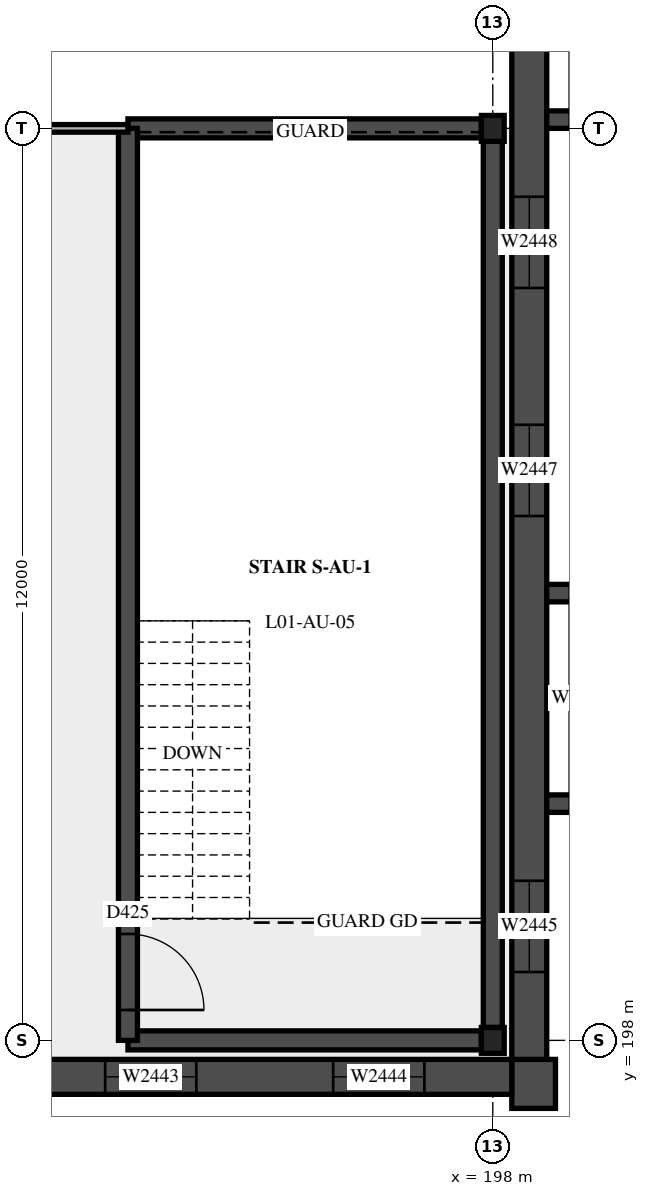
"""IFC4 building model, lengths in metres.
Left out: names, types, materials, properties, quantities, classifications, styles, units other than length and angle.
Written with IfcOpenShell. Run it as: python <this file> out.ifc"""

import sys

from ifc_helpers import new_model, si_unit, direction, frame, frame_2d, origin, origin_2d, place, context, subcontext, project, spatial, rectangle, i_section, extrude, element, fill, save


model = new_model("IFC4")
c1 = context("Model", 3, precision=1e-05, world=origin(), true_north=direction((0.0, 1.0)))
c2 = subcontext(c1, "Body", "Model", "MODEL_VIEW")
j1 = project(units=[si_unit("LENGTHUNIT", "METRE"), si_unit("PLANEANGLEUNIT", "RADIAN")], contexts=[c1])
p1 = place(None, origin())
s1 = spatial("IfcSite", under=j1, at=p1, CompositionType="ELEMENT")
p2 = place(p1, origin())
s2 = spatial("IfcBuilding", under=s1, at=p2, CompositionType="ELEMENT")
p3 = place(p2, frame((0.0, 0.0, 5.4)))
s3 = spatial("IfcBuildingStorey", under=s2, at=p3, CompositionType="ELEMENT", Elevation=5.4)
for number, where, z_axis, x_axis in (
    (1, (198.0, 198.0, 0.0), (0.0, 0.0, 1.0), (1.0, 0.0, 0.0)),
    (2, (198.0, 210.0, 0.0), (0.0, 0.0, 1.0), (1.0, 0.0, 0.0)),
):
    element("IfcColumn", number, at=place(p3, frame(where, z_axis=z_axis, x_axis=x_axis)), inside=s3, PredefinedType="COLUMN", context=c2, shape_type="SweptSolid", body=[
        extrude(i_section(OverallWidth=0.3, OverallDepth=0.34, WebThickness=0.012, FlangeThickness=0.021, at=origin_2d()), origin(), (0.0, 0.0, 1.0), 5.4),
    ])
p4 = place(p3, frame((193.2, 198.0, 0.0), z_axis=(0.0, 0.0, 1.0), x_axis=(1.0, 0.0, 0.0)))
e3 = element("IfcWall", 3, at=p4, inside=s3, PredefinedType="SHEAR", context=c2, shape_type="SweptSolid", body=[
    extrude(rectangle(XDim=4.65, YDim=0.25, at=frame_2d((2.325, 0.0))), origin(), (0.0, 0.0, 1.0), 4.6),
])
p5 = place(p3, frame((198.0, 198.17, 0.0), z_axis=(0.0, 0.0, 1.0), x_axis=(0.0, 1.0, 0.0)))
e4 = element("IfcWall", 4, at=p5, inside=s3, PredefinedType="SHEAR", context=c2, shape_type="SweptSolid", body=[
    extrude(rectangle(XDim=11.66, YDim=0.25, at=frame_2d((5.83, 0.0))), origin(), (0.0, 0.0, 1.0), 4.6),
])
p6 = place(p3, frame((193.2, 210.0, 0.0), z_axis=(0.0, 0.0, 1.0), x_axis=(1.0, 0.0, 0.0)))
e5 = element("IfcWall", 5, at=p6, inside=s3, PredefinedType="SHEAR", context=c2, shape_type="SweptSolid", body=[
    extrude(rectangle(XDim=4.65, YDim=0.25, at=frame_2d((2.325, 0.0))), origin(), (0.0, 0.0, 1.0), 4.6),
])
p7 = place(p3, frame((193.2, 198.0, 0.0), z_axis=(0.0, 0.0, 1.0), x_axis=(0.0, 1.0, 0.0)))
e6 = element("IfcWall", 6, at=p7, inside=s3, PredefinedType="SHEAR", context=c2, shape_type="SweptSolid", body=[
    extrude(rectangle(XDim=12.0, YDim=0.25, at=frame_2d((6.0, 0.0))), origin(), (0.0, 0.0, 1.0), 4.6),
])
p8 = place(p7, frame((0.4, 0.0, 0.0)))
e7 = element("IfcOpeningElement", 7, at=p8, cuts=e6, PredefinedType="OPENING", context=c2, shape_type="SweptSolid", body=[
    extrude(rectangle(XDim=1.0, YDim=2.1, at=frame_2d((0.5, 1.05))), frame((0.0, 0.135, 0.0), z_axis=(0.0, -1.0, 0.0), x_axis=(1.0, 0.0, 0.0)), (0.0, 0.0, 1.0), 0.27),
])
p9 = place(p3, frame((198.25, 197.393, -0.39), z_axis=(0.0, 0.0, 1.0), x_axis=(1.0, 0.0, 0.0)))
e8 = element("IfcWall", 8, at=p9, inside=s3, PredefinedType="SOLIDWALL", context=c2, shape_type="SweptSolid", body=[
    extrude(rectangle(XDim=0.69, YDim=0.715, at=frame_2d((0.345, 0.0))), origin(), (0.0, 0.0, 1.0), 0.13),
])
p10 = place(p3, frame((198.25, 197.357, -0.26), z_axis=(0.0, 0.0, 1.0), x_axis=(1.0, 0.0, 0.0)))
e9 = element("IfcWall", 9, at=p10, inside=s3, PredefinedType="SOLIDWALL", context=c2, shape_type="SweptSolid", body=[
    extrude(rectangle(XDim=0.805, YDim=0.785, at=frame_2d((0.402, 0.0))), origin(), (0.0, 0.0, 1.0), 0.13),
])
p11 = place(p3, frame((198.25, 197.323, -0.13), z_axis=(0.0, 0.0, 1.0), x_axis=(1.0, 0.0, 0.0)))
e10 = element("IfcWall", 10, at=p11, inside=s3, PredefinedType="SOLIDWALL", context=c2, shape_type="SweptSolid", body=[
    extrude(rectangle(XDim=0.92, YDim=0.855, at=frame_2d((0.46, 0.0))), origin(), (0.0, 0.0, 1.0), 0.13),
])
p12 = place(p3, frame((198.25, 197.427, 0.0), z_axis=(0.0, 0.0, 1.0), x_axis=(1.0, 0.0, 0.0)))
e11 = element("IfcWall", 11, at=p12, inside=s3, PredefinedType="SOLIDWALL", context=c2, shape_type="SweptSolid", body=[
    extrude(rectangle(XDim=0.575, YDim=0.645, at=frame_2d((0.288, 0.0))), origin(), (0.0, 0.0, 1.0), 5.01),
])
p13 = place(p3, frame((198.25, 197.393, 5.01), z_axis=(0.0, 0.0, 1.0), x_axis=(1.0, 0.0, 0.0)))
e12 = element("IfcWall", 12, at=p13, inside=s3, PredefinedType="SOLIDWALL", context=c2, shape_type="SweptSolid", body=[
    extrude(rectangle(XDim=0.69, YDim=0.715, at=frame_2d((0.345, 0.0))), origin(), (0.0, 0.0, 1.0), 0.13),
])
p14 = place(p3, frame((198.25, 197.357, 5.14), z_axis=(0.0, 0.0, 1.0), x_axis=(1.0, 0.0, 0.0)))
e13 = element("IfcWall", 13, at=p14, inside=s3, PredefinedType="SOLIDWALL", context=c2, shape_type="SweptSolid", body=[
    extrude(rectangle(XDim=0.805, YDim=0.785, at=frame_2d((0.402, 0.0))), origin(), (0.0, 0.0, 1.0), 0.13),
])
p15 = place(p3, frame((198.25, 197.323, 5.27), z_axis=(0.0, 0.0, 1.0), x_axis=(1.0, 0.0, 0.0)))
e14 = element("IfcWall", 14, at=p15, inside=s3, PredefinedType="SOLIDWALL", context=c2, shape_type="SweptSolid", body=[
    extrude(rectangle(XDim=0.92, YDim=0.855, at=frame_2d((0.46, 0.0))), origin(), (0.0, 0.0, 1.0), 0.13),
])
p16 = place(p3, frame((161.75, 197.52, 0.0), z_axis=(0.0, 0.0, 1.0), x_axis=(1.0, 0.0, 0.0)))
e15 = element("IfcWall", 15, at=p16, inside=s3, PredefinedType="SOLIDWALL", context=c2, shape_type="SweptSolid", body=[
    extrude(rectangle(XDim=36.5, YDim=0.46, at=frame_2d((18.25, 0.0))), origin(), (0.0, 0.0, 1.0), 5.4),
])
p17 = place(p16, frame((1.15, 0.0, 0.9)))
e16 = element("IfcOpeningElement", 16, at=p17, cuts=e15, PredefinedType="OPENING", context=c2, shape_type="SweptSolid", body=[
    extrude(rectangle(XDim=1.2, YDim=3.3, at=frame_2d((0.6, 1.65))), frame((0.0, 0.24, 0.0), z_axis=(0.0, -1.0, 0.0), x_axis=(1.0, 0.0, 0.0)), (0.0, 0.0, 1.0), 0.48),
])
p18 = place(p16, frame((4.15, 0.0, 0.9)))
e17 = element("IfcOpeningElement", 17, at=p18, cuts=e15, PredefinedType="OPENING", context=c2, shape_type="SweptSolid", body=[
    extrude(rectangle(XDim=1.2, YDim=3.3, at=frame_2d((0.6, 1.65))), frame((0.0, 0.24, 0.0), z_axis=(0.0, -1.0, 0.0), x_axis=(1.0, 0.0, 0.0)), (0.0, 0.0, 1.0), 0.48),
])
p19 = place(p16, frame((7.15, 0.0, 0.9)))
e18 = element("IfcOpeningElement", 18, at=p19, cuts=e15, PredefinedType="OPENING", context=c2, shape_type="SweptSolid", body=[
    extrude(rectangle(XDim=1.2, YDim=3.3, at=frame_2d((0.6, 1.65))), frame((0.0, 0.24, 0.0), z_axis=(0.0, -1.0, 0.0), x_axis=(1.0, 0.0, 0.0)), (0.0, 0.0, 1.0), 0.48),
])
p20 = place(p16, frame((10.15, 0.0, 0.9)))
e19 = element("IfcOpeningElement", 19, at=p20, cuts=e15, PredefinedType="OPENING", context=c2, shape_type="SweptSolid", body=[
    extrude(rectangle(XDim=1.2, YDim=3.3, at=frame_2d((0.6, 1.65))), frame((0.0, 0.24, 0.0), z_axis=(0.0, -1.0, 0.0), x_axis=(1.0, 0.0, 0.0)), (0.0, 0.0, 1.0), 0.48),
])
p21 = place(p16, frame((13.15, 0.0, 0.9)))
e20 = element("IfcOpeningElement", 20, at=p21, cuts=e15, PredefinedType="OPENING", context=c2, shape_type="SweptSolid", body=[
    extrude(rectangle(XDim=1.2, YDim=3.3, at=frame_2d((0.6, 1.65))), frame((0.0, 0.24, 0.0), z_axis=(0.0, -1.0, 0.0), x_axis=(1.0, 0.0, 0.0)), (0.0, 0.0, 1.0), 0.48),
])
p22 = place(p16, frame((16.15, 0.0, 0.9)))
e21 = element("IfcOpeningElement", 21, at=p22, cuts=e15, PredefinedType="OPENING", context=c2, shape_type="SweptSolid", body=[
    extrude(rectangle(XDim=1.2, YDim=3.3, at=frame_2d((0.6, 1.65))), frame((0.0, 0.24, 0.0), z_axis=(0.0, -1.0, 0.0), x_axis=(1.0, 0.0, 0.0)), (0.0, 0.0, 1.0), 0.48),
])
p23 = place(p16, frame((19.15, 0.0, 0.9)))
e22 = element("IfcOpeningElement", 22, at=p23, cuts=e15, PredefinedType="OPENING", context=c2, shape_type="SweptSolid", body=[
    extrude(rectangle(XDim=1.2, YDim=3.3, at=frame_2d((0.6, 1.65))), frame((0.0, 0.24, 0.0), z_axis=(0.0, -1.0, 0.0), x_axis=(1.0, 0.0, 0.0)), (0.0, 0.0, 1.0), 0.48),
])
p24 = place(p16, frame((22.15, 0.0, 0.9)))
e23 = element("IfcOpeningElement", 23, at=p24, cuts=e15, PredefinedType="OPENING", context=c2, shape_type="SweptSolid", body=[
    extrude(rectangle(XDim=1.2, YDim=3.3, at=frame_2d((0.6, 1.65))), frame((0.0, 0.24, 0.0), z_axis=(0.0, -1.0, 0.0), x_axis=(1.0, 0.0, 0.0)), (0.0, 0.0, 1.0), 0.48),
])
p25 = place(p16, frame((25.15, 0.0, 0.9)))
e24 = element("IfcOpeningElement", 24, at=p25, cuts=e15, PredefinedType="OPENING", context=c2, shape_type="SweptSolid", body=[
    extrude(rectangle(XDim=1.2, YDim=3.3, at=frame_2d((0.6, 1.65))), frame((0.0, 0.24, 0.0), z_axis=(0.0, -1.0, 0.0), x_axis=(1.0, 0.0, 0.0)), (0.0, 0.0, 1.0), 0.48),
])
p26 = place(p16, frame((28.15, 0.0, 0.9)))
e25 = element("IfcOpeningElement", 25, at=p26, cuts=e15, PredefinedType="OPENING", context=c2, shape_type="SweptSolid", body=[
    extrude(rectangle(XDim=1.2, YDim=3.3, at=frame_2d((0.6, 1.65))), frame((0.0, 0.24, 0.0), z_axis=(0.0, -1.0, 0.0), x_axis=(1.0, 0.0, 0.0)), (0.0, 0.0, 1.0), 0.48),
])
p27 = place(p16, frame((31.15, 0.0, 0.9)))
e26 = element("IfcOpeningElement", 26, at=p27, cuts=e15, PredefinedType="OPENING", context=c2, shape_type="SweptSolid", body=[
    extrude(rectangle(XDim=1.2, YDim=3.3, at=frame_2d((0.6, 1.65))), frame((0.0, 0.24, 0.0), z_axis=(0.0, -1.0, 0.0), x_axis=(1.0, 0.0, 0.0)), (0.0, 0.0, 1.0), 0.48),
])
p28 = place(p16, frame((34.15, 0.0, 0.9)))
e27 = element("IfcOpeningElement", 27, at=p28, cuts=e15, PredefinedType="OPENING", context=c2, shape_type="SweptSolid", body=[
    extrude(rectangle(XDim=1.2, YDim=3.3, at=frame_2d((0.6, 1.65))), frame((0.0, 0.24, 0.0), z_axis=(0.0, -1.0, 0.0), x_axis=(1.0, 0.0, 0.0)), (0.0, 0.0, 1.0), 0.48),
])
p29 = place(p3, frame((198.48, 197.75, 0.0), z_axis=(0.0, 0.0, 1.0), x_axis=(0.0, 1.0, 0.0)))
e28 = element("IfcWall", 28, at=p29, inside=s3, PredefinedType="SOLIDWALL", context=c2, shape_type="SweptSolid", body=[
    extrude(rectangle(XDim=36.5, YDim=0.46, at=frame_2d((18.25, 0.0))), origin(), (0.0, 0.0, 1.0), 5.4),
])
p30 = place(p29, frame((1.15, 0.0, 0.9)))
e29 = element("IfcOpeningElement", 29, at=p30, cuts=e28, PredefinedType="OPENING", context=c2, shape_type="SweptSolid", body=[
    extrude(rectangle(XDim=1.2, YDim=3.3, at=frame_2d((0.6, 1.65))), frame((0.0, 0.24, 0.0), z_axis=(0.0, -1.0, 0.0), x_axis=(1.0, 0.0, 0.0)), (0.0, 0.0, 1.0), 0.48),
])
p31 = place(p29, frame((3.55, 0.0, 0.9)))
e30 = element("IfcOpeningElement", 30, at=p31, cuts=e28, PredefinedType="OPENING", context=c2, shape_type="SweptSolid", body=[
    extrude(rectangle(XDim=2.4, YDim=2.1, at=frame_2d((1.2, 1.05))), frame((0.0, 0.24, 0.0), z_axis=(0.0, -1.0, 0.0), x_axis=(1.0, 0.0, 0.0)), (0.0, 0.0, 1.0), 0.48),
])
p32 = place(p29, frame((7.15, 0.0, 0.9)))
e31 = element("IfcOpeningElement", 31, at=p32, cuts=e28, PredefinedType="OPENING", context=c2, shape_type="SweptSolid", body=[
    extrude(rectangle(XDim=1.2, YDim=3.3, at=frame_2d((0.6, 1.65))), frame((0.0, 0.24, 0.0), z_axis=(0.0, -1.0, 0.0), x_axis=(1.0, 0.0, 0.0)), (0.0, 0.0, 1.0), 0.48),
])
p33 = place(p29, frame((10.15, 0.0, 0.9)))
e32 = element("IfcOpeningElement", 32, at=p33, cuts=e28, PredefinedType="OPENING", context=c2, shape_type="SweptSolid", body=[
    extrude(rectangle(XDim=1.2, YDim=3.3, at=frame_2d((0.6, 1.65))), frame((0.0, 0.24, 0.0), z_axis=(0.0, -1.0, 0.0), x_axis=(1.0, 0.0, 0.0)), (0.0, 0.0, 1.0), 0.48),
])
p34 = place(p29, frame((12.55, 0.0, 0.9)))
e33 = element("IfcOpeningElement", 33, at=p34, cuts=e28, PredefinedType="OPENING", context=c2, shape_type="SweptSolid", body=[
    extrude(rectangle(XDim=2.4, YDim=2.1, at=frame_2d((1.2, 1.05))), frame((0.0, 0.24, 0.0), z_axis=(0.0, -1.0, 0.0), x_axis=(1.0, 0.0, 0.0)), (0.0, 0.0, 1.0), 0.48),
])
p35 = place(p29, frame((16.15, 0.0, 0.9)))
e34 = element("IfcOpeningElement", 34, at=p35, cuts=e28, PredefinedType="OPENING", context=c2, shape_type="SweptSolid", body=[
    extrude(rectangle(XDim=1.2, YDim=3.3, at=frame_2d((0.6, 1.65))), frame((0.0, 0.24, 0.0), z_axis=(0.0, -1.0, 0.0), x_axis=(1.0, 0.0, 0.0)), (0.0, 0.0, 1.0), 0.48),
])
p36 = place(p29, frame((19.15, 0.0, 0.9)))
e35 = element("IfcOpeningElement", 35, at=p36, cuts=e28, PredefinedType="OPENING", context=c2, shape_type="SweptSolid", body=[
    extrude(rectangle(XDim=1.2, YDim=3.3, at=frame_2d((0.6, 1.65))), frame((0.0, 0.24, 0.0), z_axis=(0.0, -1.0, 0.0), x_axis=(1.0, 0.0, 0.0)), (0.0, 0.0, 1.0), 0.48),
])
p37 = place(p29, frame((21.55, 0.0, 0.9)))
e36 = element("IfcOpeningElement", 36, at=p37, cuts=e28, PredefinedType="OPENING", context=c2, shape_type="SweptSolid", body=[
    extrude(rectangle(XDim=2.4, YDim=2.1, at=frame_2d((1.2, 1.05))), frame((0.0, 0.24, 0.0), z_axis=(0.0, -1.0, 0.0), x_axis=(1.0, 0.0, 0.0)), (0.0, 0.0, 1.0), 0.48),
])
p38 = place(p29, frame((25.15, 0.0, 0.9)))
e37 = element("IfcOpeningElement", 37, at=p38, cuts=e28, PredefinedType="OPENING", context=c2, shape_type="SweptSolid", body=[
    extrude(rectangle(XDim=1.2, YDim=3.3, at=frame_2d((0.6, 1.65))), frame((0.0, 0.24, 0.0), z_axis=(0.0, -1.0, 0.0), x_axis=(1.0, 0.0, 0.0)), (0.0, 0.0, 1.0), 0.48),
])
p39 = place(p29, frame((28.15, 0.0, 0.9)))
e38 = element("IfcOpeningElement", 38, at=p39, cuts=e28, PredefinedType="OPENING", context=c2, shape_type="SweptSolid", body=[
    extrude(rectangle(XDim=1.2, YDim=3.3, at=frame_2d((0.6, 1.65))), frame((0.0, 0.24, 0.0), z_axis=(0.0, -1.0, 0.0), x_axis=(1.0, 0.0, 0.0)), (0.0, 0.0, 1.0), 0.48),
])
p40 = place(p29, frame((30.55, 0.0, 0.9)))
e39 = element("IfcOpeningElement", 39, at=p40, cuts=e28, PredefinedType="OPENING", context=c2, shape_type="SweptSolid", body=[
    extrude(rectangle(XDim=2.4, YDim=2.1, at=frame_2d((1.2, 1.05))), frame((0.0, 0.24, 0.0), z_axis=(0.0, -1.0, 0.0), x_axis=(1.0, 0.0, 0.0)), (0.0, 0.0, 1.0), 0.48),
])
p41 = place(p29, frame((34.15, 0.0, 0.9)))
e40 = element("IfcOpeningElement", 40, at=p41, cuts=e28, PredefinedType="OPENING", context=c2, shape_type="SweptSolid", body=[
    extrude(rectangle(XDim=1.2, YDim=3.3, at=frame_2d((0.6, 1.65))), frame((0.0, 0.24, 0.0), z_axis=(0.0, -1.0, 0.0), x_axis=(1.0, 0.0, 0.0)), (0.0, 0.0, 1.0), 0.48),
])
p42 = place(p3, frame((198.8, 201.0, -0.6), z_axis=(0.0, 0.0, 1.0), x_axis=(0.0, 1.0, 0.0)))
e41 = element("IfcWall", 41, at=p42, inside=s3, PredefinedType="SOLIDWALL", context=c2, shape_type="SweptSolid", body=[
    extrude(rectangle(XDim=3.0, YDim=0.18, at=frame_2d((1.5, 0.0))), origin(), (0.0, 0.0, 1.0), 0.2),
])
p43 = place(p3, frame((198.895, 201.0, -0.4), z_axis=(0.0, 0.0, 1.0), x_axis=(0.0, 1.0, 0.0)))
e42 = element("IfcWall", 42, at=p43, inside=s3, PredefinedType="SOLIDWALL", context=c2, shape_type="SweptSolid", body=[
    extrude(rectangle(XDim=3.0, YDim=0.37, at=frame_2d((1.5, 0.0))), origin(), (0.0, 0.0, 1.0), 0.2),
])
p44 = place(p3, frame((198.985, 201.0, -0.2), z_axis=(0.0, 0.0, 1.0), x_axis=(0.0, 1.0, 0.0)))
e43 = element("IfcWall", 43, at=p44, inside=s3, PredefinedType="SOLIDWALL", context=c2, shape_type="SweptSolid", body=[
    extrude(rectangle(XDim=3.0, YDim=0.55, at=frame_2d((1.5, 0.0))), origin(), (0.0, 0.0, 1.0), 0.2),
])
for number, where, z_axis, x_axis in (
    (44, (198.71, 201.115, 0.0), (0.0, 0.0, 1.0), (1.0, 0.0, 0.0)),
    (45, (198.71, 203.885, 0.0), (0.0, 0.0, 1.0), (1.0, 0.0, 0.0)),
):
    element("IfcWall", number, at=place(p3, frame(where, z_axis=z_axis, x_axis=x_axis)), inside=s3, PredefinedType="SOLIDWALL", context=c2, shape_type="SweptSolid", body=[
        extrude(rectangle(XDim=0.32, YDim=0.23, at=frame_2d((0.16, 0.0))), origin(), (0.0, 0.0, 1.0), 3.6),
    ])
p45 = place(p3, frame((198.985, 201.0, 3.6), z_axis=(0.0, 0.0, 1.0), x_axis=(0.0, 1.0, 0.0)))
e46 = element("IfcWall", 46, at=p45, inside=s3, PredefinedType="SOLIDWALL", context=c2, shape_type="SweptSolid", body=[
    extrude(rectangle(XDim=3.0, YDim=0.55, at=frame_2d((1.5, 0.0))), origin(), (0.0, 0.0, 1.0), 0.15),
])
p46 = place(p3, frame((198.8, 210.0, -0.6), z_axis=(0.0, 0.0, 1.0), x_axis=(0.0, 1.0, 0.0)))
e47 = element("IfcWall", 47, at=p46, inside=s3, PredefinedType="SOLIDWALL", context=c2, shape_type="SweptSolid", body=[
    extrude(rectangle(XDim=3.0, YDim=0.18, at=frame_2d((1.5, 0.0))), origin(), (0.0, 0.0, 1.0), 0.2),
])
p47 = place(p3, frame((198.895, 210.0, -0.4), z_axis=(0.0, 0.0, 1.0), x_axis=(0.0, 1.0, 0.0)))
e48 = element("IfcWall", 48, at=p47, inside=s3, PredefinedType="SOLIDWALL", context=c2, shape_type="SweptSolid", body=[
    extrude(rectangle(XDim=3.0, YDim=0.37, at=frame_2d((1.5, 0.0))), origin(), (0.0, 0.0, 1.0), 0.2),
])
p48 = place(p3, frame((198.985, 210.0, -0.2), z_axis=(0.0, 0.0, 1.0), x_axis=(0.0, 1.0, 0.0)))
e49 = element("IfcWall", 49, at=p48, inside=s3, PredefinedType="SOLIDWALL", context=c2, shape_type="SweptSolid", body=[
    extrude(rectangle(XDim=3.0, YDim=0.55, at=frame_2d((1.5, 0.0))), origin(), (0.0, 0.0, 1.0), 0.2),
])
p49 = place(p3, frame((198.71, 210.115, 0.0), z_axis=(0.0, 0.0, 1.0), x_axis=(1.0, 0.0, 0.0)))
e50 = element("IfcWall", 50, at=p49, inside=s3, PredefinedType="SOLIDWALL", context=c2, shape_type="SweptSolid", body=[
    extrude(rectangle(XDim=0.32, YDim=0.23, at=frame_2d((0.16, 0.0))), origin(), (0.0, 0.0, 1.0), 3.6),
])
p50 = place(p3, frame((198.985, 210.0, 3.6), z_axis=(0.0, 0.0, 1.0), x_axis=(0.0, 1.0, 0.0)))
e51 = element("IfcWall", 51, at=p50, inside=s3, PredefinedType="SOLIDWALL", context=c2, shape_type="SweptSolid", body=[
    extrude(rectangle(XDim=3.0, YDim=0.55, at=frame_2d((1.5, 0.0))), origin(), (0.0, 0.0, 1.0), 0.15),
])
p51 = place(p3, frame((189.8, 210.0, 0.0), z_axis=(0.0, 0.0, 1.0), x_axis=(1.0, 0.0, 0.0)))
e52 = element("IfcWall", 52, at=p51, inside=s3, PredefinedType="PARTITIONING", context=c2, shape_type="SweptSolid", body=[
    extrude(rectangle(XDim=3.4, YDim=0.1, at=frame_2d((1.7, 0.0))), origin(), (0.0, 0.0, 1.0), 3.6),
])
p52 = place(p27, origin())
e53 = element("IfcWindow", 53, at=p52, inside=s3, PartitioningType="SINGLE_PANEL", PredefinedType="WINDOW", context=c2, shape_type="SweptSolid", body=[
    extrude(rectangle(XDim=1.2, YDim=3.3, at=frame_2d((0.6, 1.65))), frame((0.0, 0.03, 0.0), z_axis=(0.0, -1.0, 0.0), x_axis=(1.0, 0.0, 0.0)), (0.0, 0.0, 1.0), 0.06),
])
fill(e26, e53)
p53 = place(p28, origin())
e54 = element("IfcWindow", 54, at=p53, inside=s3, PartitioningType="SINGLE_PANEL", PredefinedType="WINDOW", context=c2, shape_type="SweptSolid", body=[
    extrude(rectangle(XDim=1.2, YDim=3.3, at=frame_2d((0.6, 1.65))), frame((0.0, 0.03, 0.0), z_axis=(0.0, -1.0, 0.0), x_axis=(1.0, 0.0, 0.0)), (0.0, 0.0, 1.0), 0.06),
])
fill(e27, e54)
p54 = place(p30, origin())
e55 = element("IfcWindow", 55, at=p54, inside=s3, PartitioningType="SINGLE_PANEL", PredefinedType="WINDOW", context=c2, shape_type="SweptSolid", body=[
    extrude(rectangle(XDim=1.2, YDim=3.3, at=frame_2d((0.6, 1.65))), frame((0.0, 0.03, 0.0), z_axis=(0.0, -1.0, 0.0), x_axis=(1.0, 0.0, 0.0)), (0.0, 0.0, 1.0), 0.06),
])
fill(e29, e55)
p55 = place(p32, origin())
e56 = element("IfcWindow", 56, at=p55, inside=s3, PartitioningType="SINGLE_PANEL", PredefinedType="WINDOW", context=c2, shape_type="SweptSolid", body=[
    extrude(rectangle(XDim=1.2, YDim=3.3, at=frame_2d((0.6, 1.65))), frame((0.0, 0.03, 0.0), z_axis=(0.0, -1.0, 0.0), x_axis=(1.0, 0.0, 0.0)), (0.0, 0.0, 1.0), 0.06),
])
fill(e31, e56)
p56 = place(p33, origin())
e57 = element("IfcWindow", 57, at=p56, inside=s3, PartitioningType="SINGLE_PANEL", PredefinedType="WINDOW", context=c2, shape_type="SweptSolid", body=[
    extrude(rectangle(XDim=1.2, YDim=3.3, at=frame_2d((0.6, 1.65))), frame((0.0, 0.03, 0.0), z_axis=(0.0, -1.0, 0.0), x_axis=(1.0, 0.0, 0.0)), (0.0, 0.0, 1.0), 0.06),
])
fill(e32, e57)
p57 = place(p8, origin())
e58 = element("IfcDoor", 58, at=p57, inside=s3, OperationType="SINGLE_SWING_RIGHT", PredefinedType="DOOR", context=c2, shape_type="SweptSolid", body=[
    extrude(rectangle(XDim=1.0, YDim=2.1, at=frame_2d((0.5, 1.05))), frame((0.0, 0.025, 0.0), z_axis=(0.0, -1.0, 0.0), x_axis=(1.0, 0.0, 0.0)), (0.0, 0.0, 1.0), 0.05),
])
fill(e7, e58)
save(model, sys.argv[1])
